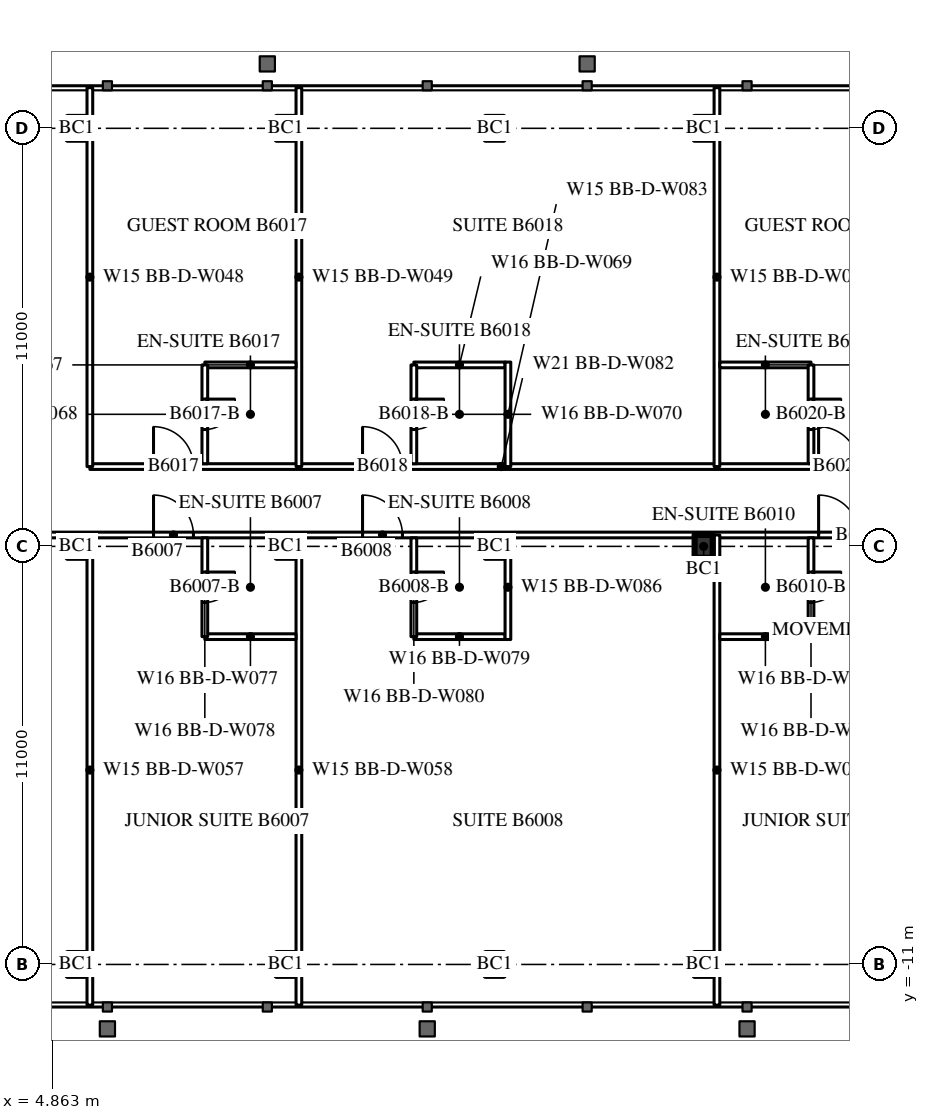
"""IFC4 building model, lengths in metres.
Left out: names, types, materials, properties, quantities, classifications, styles, units other than length and angle.
Written with IfcOpenShell. Run it as: python <this file> out.ifc"""

import sys

from ifc_helpers import new_model, si_unit, direction, frame, frame_2d, origin, origin_2d, place, context, subcontext, project, spatial, rectangle, i_section, extrude, element, fill, save


model = new_model("IFC4")
c1 = context("Model", 3, precision=1e-05, world=origin(), true_north=direction((0.0, 1.0)))
c2 = subcontext(c1, "Body", "Model", "MODEL_VIEW")
j1 = project(units=[si_unit("LENGTHUNIT", "METRE"), si_unit("PLANEANGLEUNIT", "RADIAN")], contexts=[c1])
p1 = place(None, origin())
s1 = spatial("IfcSite", under=j1, at=p1, CompositionType="ELEMENT")
p2 = place(p1, origin())
s2 = spatial("IfcBuilding", under=s1, at=p2, CompositionType="ELEMENT")
p3 = place(p2, frame((0.0, 0.0, 226.1)))
s3 = spatial("IfcBuildingStorey", under=s2, at=p3, CompositionType="ELEMENT", Elevation=226.1)
for number, where, z_axis, x_axis in (
    (1, (5.5, -11.0, 0.0), (0.0, 0.0, 1.0), (1.0, 0.0, 0.0)),
    (2, (11.0, -11.0, 0.0), (0.0, 0.0, 1.0), (1.0, 0.0, 0.0)),
    (3, (16.5, -11.0, 0.0), (0.0, 0.0, 1.0), (1.0, 0.0, 0.0)),
    (4, (22.0, -11.0, 0.0), (0.0, 0.0, 1.0), (1.0, 0.0, 0.0)),
    (5, (5.5, 0.0, 0.0), (0.0, 0.0, 1.0), (1.0, 0.0, 0.0)),
    (6, (11.0, 0.0, 0.0), (0.0, 0.0, 1.0), (1.0, 0.0, 0.0)),
    (7, (16.5, 0.0, 0.0), (0.0, 0.0, 1.0), (1.0, 0.0, 0.0)),
    (8, (22.0, 0.0, 0.0), (0.0, 0.0, 1.0), (1.0, 0.0, 0.0)),
    (9, (5.5, 11.0, 0.0), (0.0, 0.0, 1.0), (1.0, 0.0, 0.0)),
    (10, (11.0, 11.0, 0.0), (0.0, 0.0, 1.0), (1.0, 0.0, 0.0)),
    (11, (16.5, 11.0, 0.0), (0.0, 0.0, 1.0), (1.0, 0.0, 0.0)),
    (12, (22.0, 11.0, 0.0), (0.0, 0.0, 1.0), (1.0, 0.0, 0.0)),
):
    element("IfcColumn", number, at=place(p3, frame(where, z_axis=z_axis, x_axis=x_axis)), inside=s3, PredefinedType="COLUMN", context=c2, shape_type="SweptSolid", body=[
        extrude(i_section(OverallWidth=0.476, OverallDepth=0.6, WebThickness=0.1, FlangeThickness=0.14, FilletRadius=0.02, at=origin_2d()), origin(), (0.0, 0.0, 1.0), 3.6),
    ])
p4 = place(p3, frame((-27.5, 0.3, 0.0), z_axis=(0.0, 0.0, 1.0), x_axis=(1.0, 0.0, 0.0)))
e13 = element("IfcWall", 13, at=p4, inside=s3, PredefinedType="PARTITIONING", context=c2, shape_type="SweptSolid", body=[
    extrude(rectangle(XDim=55.0, YDim=0.15, at=frame_2d((27.5, 0.0))), origin(), (0.0, 0.0, 1.0), 2.4),
])
p5 = place(p4, frame((1.575, 0.0, 0.0)))
e14 = element("IfcOpeningElement", 14, at=p5, cuts=e13, PredefinedType="OPENING", context=c2, shape_type="SweptSolid", body=[
    extrude(rectangle(XDim=1.0, YDim=2.2, at=frame_2d((0.5, 1.1))), frame((0.0, 0.085, 0.0), z_axis=(0.0, -1.0, 0.0), x_axis=(1.0, 0.0, 0.0)), (0.0, 0.0, 1.0), 0.17),
])
p6 = place(p4, frame((7.525, 0.0, 0.0)))
e15 = element("IfcOpeningElement", 15, at=p6, cuts=e13, PredefinedType="OPENING", context=c2, shape_type="SweptSolid", body=[
    extrude(rectangle(XDim=1.05, YDim=2.4, at=frame_2d((0.525, 1.2))), frame((0.0, 0.085, 0.0), z_axis=(0.0, -1.0, 0.0), x_axis=(1.0, 0.0, 0.0)), (0.0, 0.0, 1.0), 0.17),
])
p7 = place(p4, frame((18.525, 0.0, 0.0)))
e16 = element("IfcOpeningElement", 16, at=p7, cuts=e13, PredefinedType="OPENING", context=c2, shape_type="SweptSolid", body=[
    extrude(rectangle(XDim=1.05, YDim=2.4, at=frame_2d((0.525, 1.2))), frame((0.0, 0.085, 0.0), z_axis=(0.0, -1.0, 0.0), x_axis=(1.0, 0.0, 0.0)), (0.0, 0.0, 1.0), 0.17),
])
p8 = place(p4, frame((24.025, 0.0, 0.0)))
e17 = element("IfcOpeningElement", 17, at=p8, cuts=e13, PredefinedType="OPENING", context=c2, shape_type="SweptSolid", body=[
    extrude(rectangle(XDim=1.05, YDim=2.4, at=frame_2d((0.525, 1.2))), frame((0.0, 0.085, 0.0), z_axis=(0.0, -1.0, 0.0), x_axis=(1.0, 0.0, 0.0)), (0.0, 0.0, 1.0), 0.17),
])
p9 = place(p4, frame((35.025, 0.0, 0.0)))
e18 = element("IfcOpeningElement", 18, at=p9, cuts=e13, PredefinedType="OPENING", context=c2, shape_type="SweptSolid", body=[
    extrude(rectangle(XDim=1.05, YDim=2.4, at=frame_2d((0.525, 1.2))), frame((0.0, 0.085, 0.0), z_axis=(0.0, -1.0, 0.0), x_axis=(1.0, 0.0, 0.0)), (0.0, 0.0, 1.0), 0.17),
])
p10 = place(p4, frame((40.525, 0.0, 0.0)))
e19 = element("IfcOpeningElement", 19, at=p10, cuts=e13, PredefinedType="OPENING", context=c2, shape_type="SweptSolid", body=[
    extrude(rectangle(XDim=1.05, YDim=2.4, at=frame_2d((0.525, 1.2))), frame((0.0, 0.085, 0.0), z_axis=(0.0, -1.0, 0.0), x_axis=(1.0, 0.0, 0.0)), (0.0, 0.0, 1.0), 0.17),
])
p11 = place(p4, frame((52.525, 0.0, 0.0)))
e20 = element("IfcOpeningElement", 20, at=p11, cuts=e13, PredefinedType="OPENING", context=c2, shape_type="SweptSolid", body=[
    extrude(rectangle(XDim=1.05, YDim=2.4, at=frame_2d((0.525, 1.2))), frame((0.0, 0.085, 0.0), z_axis=(0.0, -1.0, 0.0), x_axis=(1.0, 0.0, 0.0)), (0.0, 0.0, 1.0), 0.17),
])
p12 = place(p3, frame((5.85, 2.1, 0.0), z_axis=(0.0, 0.0, 1.0), x_axis=(1.0, 0.0, 0.0)))
e21 = element("IfcWall", 21, at=p12, inside=s3, PredefinedType="PARTITIONING", context=c2, shape_type="SweptSolid", body=[
    extrude(rectangle(XDim=21.65, YDim=0.15, at=frame_2d((10.825, 0.0))), origin(), (0.0, 0.0, 1.0), 3.4),
])
p13 = place(p12, frame((1.675, 0.0, 0.0)))
e22 = element("IfcOpeningElement", 22, at=p13, cuts=e21, PredefinedType="OPENING", context=c2, shape_type="SweptSolid", body=[
    extrude(rectangle(XDim=1.05, YDim=2.4, at=frame_2d((0.525, 1.2))), frame((0.0, 0.085, 0.0), z_axis=(0.0, -1.0, 0.0), x_axis=(1.0, 0.0, 0.0)), (0.0, 0.0, 1.0), 0.17),
])
p14 = place(p12, frame((7.175, 0.0, 0.0)))
e23 = element("IfcOpeningElement", 23, at=p14, cuts=e21, PredefinedType="OPENING", context=c2, shape_type="SweptSolid", body=[
    extrude(rectangle(XDim=1.05, YDim=2.4, at=frame_2d((0.525, 1.2))), frame((0.0, 0.085, 0.0), z_axis=(0.0, -1.0, 0.0), x_axis=(1.0, 0.0, 0.0)), (0.0, 0.0, 1.0), 0.17),
])
p15 = place(p12, frame((19.175, 0.0, 0.0)))
e24 = element("IfcOpeningElement", 24, at=p15, cuts=e21, PredefinedType="OPENING", context=c2, shape_type="SweptSolid", body=[
    extrude(rectangle(XDim=1.05, YDim=2.4, at=frame_2d((0.525, 1.2))), frame((0.0, 0.085, 0.0), z_axis=(0.0, -1.0, 0.0), x_axis=(1.0, 0.0, 0.0)), (0.0, 0.0, 1.0), 0.17),
])
for number, where, z_axis, x_axis in (
    (25, (5.85, -12.07, 0.0), (0.0, 0.0, 1.0), (0.0, 1.0, 0.0)),
    (26, (11.35, -12.07, 0.0), (0.0, 0.0, 1.0), (0.0, 1.0, 0.0)),
    (27, (22.35, -12.07, 0.0), (0.0, 0.0, 1.0), (0.0, 1.0, 0.0)),
):
    element("IfcWall", number, at=place(p3, frame(where, z_axis=z_axis, x_axis=x_axis)), inside=s3, PredefinedType="PARTITIONING", context=c2, shape_type="SweptSolid", body=[
        extrude(rectangle(XDim=12.37, YDim=0.15, at=frame_2d((6.185, 0.0))), origin(), (0.0, 0.0, 1.0), 3.4),
    ])
p16 = place(p3, frame((8.875, -2.375, 0.0), z_axis=(0.0, 0.0, 1.0), x_axis=(1.0, 0.0, 0.0)))
e28 = element("IfcWall", 28, at=p16, inside=s3, PredefinedType="PARTITIONING", context=c2, shape_type="SweptSolid", body=[
    extrude(rectangle(XDim=2.4, YDim=0.15, at=frame_2d((1.2, 0.0))), origin(), (0.0, 0.0, 1.0), 3.4),
])
p17 = place(p3, frame((8.875, -2.375, 0.0), z_axis=(0.0, 0.0, 1.0), x_axis=(0.0, 1.0, 0.0)))
e29 = element("IfcWall", 29, at=p17, inside=s3, PredefinedType="PARTITIONING", context=c2, shape_type="SweptSolid", body=[
    extrude(rectangle(XDim=2.6, YDim=0.15, at=frame_2d((1.3, 0.0))), origin(), (0.0, 0.0, 1.0), 3.4),
])
p18 = place(p17, frame((0.9, 0.0, 0.0)))
e30 = element("IfcOpeningElement", 30, at=p18, cuts=e29, PredefinedType="OPENING", context=c2, shape_type="SweptSolid", body=[
    extrude(rectangle(XDim=0.8, YDim=2.2, at=frame_2d((0.4, 1.1))), frame((0.0, 0.085, 0.0), z_axis=(0.0, -1.0, 0.0), x_axis=(1.0, 0.0, 0.0)), (0.0, 0.0, 1.0), 0.17),
])
p19 = place(p3, frame((14.375, -2.375, 0.0), z_axis=(0.0, 0.0, 1.0), x_axis=(1.0, 0.0, 0.0)))
e31 = element("IfcWall", 31, at=p19, inside=s3, PredefinedType="PARTITIONING", context=c2, shape_type="SweptSolid", body=[
    extrude(rectangle(XDim=2.4, YDim=0.15, at=frame_2d((1.2, 0.0))), origin(), (0.0, 0.0, 1.0), 3.4),
])
p20 = place(p3, frame((14.375, -2.375, 0.0), z_axis=(0.0, 0.0, 1.0), x_axis=(0.0, 1.0, 0.0)))
e32 = element("IfcWall", 32, at=p20, inside=s3, PredefinedType="PARTITIONING", context=c2, shape_type="SweptSolid", body=[
    extrude(rectangle(XDim=2.6, YDim=0.15, at=frame_2d((1.3, 0.0))), origin(), (0.0, 0.0, 1.0), 3.4),
])
p21 = place(p20, frame((0.9, 0.0, 0.0)))
e33 = element("IfcOpeningElement", 33, at=p21, cuts=e32, PredefinedType="OPENING", context=c2, shape_type="SweptSolid", body=[
    extrude(rectangle(XDim=0.8, YDim=2.2, at=frame_2d((0.4, 1.1))), frame((0.0, 0.085, 0.0), z_axis=(0.0, -1.0, 0.0), x_axis=(1.0, 0.0, 0.0)), (0.0, 0.0, 1.0), 0.17),
])
p22 = place(p3, frame((22.425, -2.375, 0.0), z_axis=(0.0, 0.0, 1.0), x_axis=(1.0, 0.0, 0.0)))
e34 = element("IfcWall", 34, at=p22, inside=s3, PredefinedType="PARTITIONING", context=c2, shape_type="SweptSolid", body=[
    extrude(rectangle(XDim=2.4, YDim=0.15, at=frame_2d((1.2, 0.0))), origin(), (0.0, 0.0, 1.0), 3.4),
])
p23 = place(p3, frame((24.825, -2.375, 0.0), z_axis=(0.0, 0.0, 1.0), x_axis=(0.0, 1.0, 0.0)))
e35 = element("IfcWall", 35, at=p23, inside=s3, PredefinedType="PARTITIONING", context=c2, shape_type="SweptSolid", body=[
    extrude(rectangle(XDim=2.6, YDim=0.15, at=frame_2d((1.3, 0.0))), origin(), (0.0, 0.0, 1.0), 3.4),
])
p24 = place(p23, frame((0.9, 0.0, 0.0)))
e36 = element("IfcOpeningElement", 36, at=p24, cuts=e35, PredefinedType="OPENING", context=c2, shape_type="SweptSolid", body=[
    extrude(rectangle(XDim=0.8, YDim=2.2, at=frame_2d((0.4, 1.1))), frame((0.0, 0.085, 0.0), z_axis=(0.0, -1.0, 0.0), x_axis=(1.0, 0.0, 0.0)), (0.0, 0.0, 1.0), 0.17),
])
for number, where, z_axis, x_axis in (
    (37, (5.85, 2.1, 0.0), (0.0, 0.0, 1.0), (0.0, 1.0, 0.0)),
    (38, (11.35, 2.1, 0.0), (0.0, 0.0, 1.0), (0.0, 1.0, 0.0)),
    (39, (22.35, 2.1, 0.0), (0.0, 0.0, 1.0), (0.0, 1.0, 0.0)),
):
    element("IfcWall", number, at=place(p3, frame(where, z_axis=z_axis, x_axis=x_axis)), inside=s3, PredefinedType="PARTITIONING", context=c2, shape_type="SweptSolid", body=[
        extrude(rectangle(XDim=9.97, YDim=0.15, at=frame_2d((4.985, 0.0))), origin(), (0.0, 0.0, 1.0), 3.4),
    ])
p25 = place(p3, frame((8.875, 4.775, 0.0), z_axis=(0.0, 0.0, 1.0), x_axis=(1.0, 0.0, 0.0)))
e40 = element("IfcWall", 40, at=p25, inside=s3, PredefinedType="PARTITIONING", context=c2, shape_type="SweptSolid", body=[
    extrude(rectangle(XDim=2.4, YDim=0.15, at=frame_2d((1.2, 0.0))), origin(), (0.0, 0.0, 1.0), 3.4),
])
p26 = place(p3, frame((8.875, 2.175, 0.0), z_axis=(0.0, 0.0, 1.0), x_axis=(0.0, 1.0, 0.0)))
e41 = element("IfcWall", 41, at=p26, inside=s3, PredefinedType="PARTITIONING", context=c2, shape_type="SweptSolid", body=[
    extrude(rectangle(XDim=2.6, YDim=0.15, at=frame_2d((1.3, 0.0))), origin(), (0.0, 0.0, 1.0), 3.4),
])
p27 = place(p26, frame((0.9, 0.0, 0.0)))
e42 = element("IfcOpeningElement", 42, at=p27, cuts=e41, PredefinedType="OPENING", context=c2, shape_type="SweptSolid", body=[
    extrude(rectangle(XDim=0.8, YDim=2.2, at=frame_2d((0.4, 1.1))), frame((0.0, 0.085, 0.0), z_axis=(0.0, -1.0, 0.0), x_axis=(1.0, 0.0, 0.0)), (0.0, 0.0, 1.0), 0.17),
])
p28 = place(p3, frame((14.375, 4.775, 0.0), z_axis=(0.0, 0.0, 1.0), x_axis=(1.0, 0.0, 0.0)))
e43 = element("IfcWall", 43, at=p28, inside=s3, PredefinedType="PARTITIONING", context=c2, shape_type="SweptSolid", body=[
    extrude(rectangle(XDim=2.4, YDim=0.15, at=frame_2d((1.2, 0.0))), origin(), (0.0, 0.0, 1.0), 3.4),
])
p29 = place(p3, frame((14.375, 2.175, 0.0), z_axis=(0.0, 0.0, 1.0), x_axis=(0.0, 1.0, 0.0)))
e44 = element("IfcWall", 44, at=p29, inside=s3, PredefinedType="PARTITIONING", context=c2, shape_type="SweptSolid", body=[
    extrude(rectangle(XDim=2.6, YDim=0.15, at=frame_2d((1.3, 0.0))), origin(), (0.0, 0.0, 1.0), 3.4),
])
p30 = place(p29, frame((0.9, 0.0, 0.0)))
e45 = element("IfcOpeningElement", 45, at=p30, cuts=e44, PredefinedType="OPENING", context=c2, shape_type="SweptSolid", body=[
    extrude(rectangle(XDim=0.8, YDim=2.2, at=frame_2d((0.4, 1.1))), frame((0.0, 0.085, 0.0), z_axis=(0.0, -1.0, 0.0), x_axis=(1.0, 0.0, 0.0)), (0.0, 0.0, 1.0), 0.17),
])
p31 = place(p3, frame((22.425, 4.775, 0.0), z_axis=(0.0, 0.0, 1.0), x_axis=(1.0, 0.0, 0.0)))
e46 = element("IfcWall", 46, at=p31, inside=s3, PredefinedType="PARTITIONING", context=c2, shape_type="SweptSolid", body=[
    extrude(rectangle(XDim=2.4, YDim=0.15, at=frame_2d((1.2, 0.0))), origin(), (0.0, 0.0, 1.0), 3.4),
])
p32 = place(p3, frame((24.825, 2.175, 0.0), z_axis=(0.0, 0.0, 1.0), x_axis=(0.0, 1.0, 0.0)))
e47 = element("IfcWall", 47, at=p32, inside=s3, PredefinedType="PARTITIONING", context=c2, shape_type="SweptSolid", body=[
    extrude(rectangle(XDim=2.6, YDim=0.15, at=frame_2d((1.3, 0.0))), origin(), (0.0, 0.0, 1.0), 3.4),
])
p33 = place(p32, frame((0.9, 0.0, 0.0)))
e48 = element("IfcOpeningElement", 48, at=p33, cuts=e47, PredefinedType="OPENING", context=c2, shape_type="SweptSolid", body=[
    extrude(rectangle(XDim=0.8, YDim=2.2, at=frame_2d((0.4, 1.1))), frame((0.0, 0.085, 0.0), z_axis=(0.0, -1.0, 0.0), x_axis=(1.0, 0.0, 0.0)), (0.0, 0.0, 1.0), 0.17),
])
for number, where, z_axis, x_axis in (
    (49, (16.85, -2.45, 0.0), (0.0, 0.0, 1.0), (0.0, 1.0, 0.0)),
    (50, (16.85, 2.1, 0.0), (0.0, 0.0, 1.0), (0.0, 1.0, 0.0)),
):
    element("IfcWall", number, at=place(p3, frame(where, z_axis=z_axis, x_axis=x_axis)), inside=s3, PredefinedType="PARTITIONING", context=c2, shape_type="SweptSolid", body=[
        extrude(rectangle(XDim=2.75, YDim=0.15, at=frame_2d((1.375, 0.0))), origin(), (0.0, 0.0, 1.0), 3.4),
    ])
p34 = place(p18, origin())
e51 = element("IfcDoor", 51, at=p34, inside=s3, OperationType="SINGLE_SWING_RIGHT", PredefinedType="DOOR", context=c2, shape_type="SweptSolid", body=[
    extrude(rectangle(XDim=0.8, YDim=2.2, at=frame_2d((0.4, 1.1))), frame((0.0, 0.025, 0.0), z_axis=(0.0, -1.0, 0.0), x_axis=(1.0, 0.0, 0.0)), (0.0, 0.0, 1.0), 0.05),
])
fill(e30, e51)
p35 = place(p9, origin())
e52 = element("IfcDoor", 52, at=p35, inside=s3, OperationType="SINGLE_SWING_LEFT", PredefinedType="DOOR", context=c2, shape_type="SweptSolid", body=[
    extrude(rectangle(XDim=1.05, YDim=2.4, at=frame_2d((0.525, 1.2))), frame((0.0, 0.025, 0.0), z_axis=(0.0, -1.0, 0.0), x_axis=(1.0, 0.0, 0.0)), (0.0, 0.0, 1.0), 0.05),
])
fill(e18, e52)
p36 = place(p21, origin())
e53 = element("IfcDoor", 53, at=p36, inside=s3, OperationType="SINGLE_SWING_RIGHT", PredefinedType="DOOR", context=c2, shape_type="SweptSolid", body=[
    extrude(rectangle(XDim=0.8, YDim=2.2, at=frame_2d((0.4, 1.1))), frame((0.0, 0.025, 0.0), z_axis=(0.0, -1.0, 0.0), x_axis=(1.0, 0.0, 0.0)), (0.0, 0.0, 1.0), 0.05),
])
fill(e33, e53)
p37 = place(p10, origin())
e54 = element("IfcDoor", 54, at=p37, inside=s3, OperationType="SINGLE_SWING_LEFT", PredefinedType="DOOR", context=c2, shape_type="SweptSolid", body=[
    extrude(rectangle(XDim=1.05, YDim=2.4, at=frame_2d((0.525, 1.2))), frame((0.0, 0.025, 0.0), z_axis=(0.0, -1.0, 0.0), x_axis=(1.0, 0.0, 0.0)), (0.0, 0.0, 1.0), 0.05),
])
fill(e19, e54)
p38 = place(p24, origin())
e55 = element("IfcDoor", 55, at=p38, inside=s3, OperationType="SINGLE_SWING_RIGHT", PredefinedType="DOOR", context=c2, shape_type="SweptSolid", body=[
    extrude(rectangle(XDim=0.8, YDim=2.2, at=frame_2d((0.4, 1.1))), frame((0.0, 0.025, 0.0), z_axis=(0.0, -1.0, 0.0), x_axis=(1.0, 0.0, 0.0)), (0.0, 0.0, 1.0), 0.05),
])
fill(e36, e55)
p39 = place(p11, origin())
e56 = element("IfcDoor", 56, at=p39, inside=s3, OperationType="SINGLE_SWING_LEFT", PredefinedType="DOOR", context=c2, shape_type="SweptSolid", body=[
    extrude(rectangle(XDim=1.05, YDim=2.4, at=frame_2d((0.525, 1.2))), frame((0.0, 0.025, 0.0), z_axis=(0.0, -1.0, 0.0), x_axis=(1.0, 0.0, 0.0)), (0.0, 0.0, 1.0), 0.05),
])
fill(e20, e56)
p40 = place(p27, origin())
e57 = element("IfcDoor", 57, at=p40, inside=s3, OperationType="SINGLE_SWING_RIGHT", PredefinedType="DOOR", context=c2, shape_type="SweptSolid", body=[
    extrude(rectangle(XDim=0.8, YDim=2.2, at=frame_2d((0.4, 1.1))), frame((0.0, 0.025, 0.0), z_axis=(0.0, -1.0, 0.0), x_axis=(1.0, 0.0, 0.0)), (0.0, 0.0, 1.0), 0.05),
])
fill(e42, e57)
p41 = place(p13, origin())
e58 = element("IfcDoor", 58, at=p41, inside=s3, OperationType="SINGLE_SWING_LEFT", PredefinedType="DOOR", context=c2, shape_type="SweptSolid", body=[
    extrude(rectangle(XDim=1.05, YDim=2.4, at=frame_2d((0.525, 1.2))), frame((0.0, 0.025, 0.0), z_axis=(0.0, -1.0, 0.0), x_axis=(1.0, 0.0, 0.0)), (0.0, 0.0, 1.0), 0.05),
])
fill(e22, e58)
p42 = place(p30, origin())
e59 = element("IfcDoor", 59, at=p42, inside=s3, OperationType="SINGLE_SWING_RIGHT", PredefinedType="DOOR", context=c2, shape_type="SweptSolid", body=[
    extrude(rectangle(XDim=0.8, YDim=2.2, at=frame_2d((0.4, 1.1))), frame((0.0, 0.025, 0.0), z_axis=(0.0, -1.0, 0.0), x_axis=(1.0, 0.0, 0.0)), (0.0, 0.0, 1.0), 0.05),
])
fill(e45, e59)
p43 = place(p14, origin())
e60 = element("IfcDoor", 60, at=p43, inside=s3, OperationType="SINGLE_SWING_LEFT", PredefinedType="DOOR", context=c2, shape_type="SweptSolid", body=[
    extrude(rectangle(XDim=1.05, YDim=2.4, at=frame_2d((0.525, 1.2))), frame((0.0, 0.025, 0.0), z_axis=(0.0, -1.0, 0.0), x_axis=(1.0, 0.0, 0.0)), (0.0, 0.0, 1.0), 0.05),
])
fill(e23, e60)
p44 = place(p33, origin())
e61 = element("IfcDoor", 61, at=p44, inside=s3, OperationType="SINGLE_SWING_RIGHT", PredefinedType="DOOR", context=c2, shape_type="SweptSolid", body=[
    extrude(rectangle(XDim=0.8, YDim=2.2, at=frame_2d((0.4, 1.1))), frame((0.0, 0.025, 0.0), z_axis=(0.0, -1.0, 0.0), x_axis=(1.0, 0.0, 0.0)), (0.0, 0.0, 1.0), 0.05),
])
fill(e48, e61)
p45 = place(p15, origin())
e62 = element("IfcDoor", 62, at=p45, inside=s3, OperationType="SINGLE_SWING_LEFT", PredefinedType="DOOR", context=c2, shape_type="SweptSolid", body=[
    extrude(rectangle(XDim=1.05, YDim=2.4, at=frame_2d((0.525, 1.2))), frame((0.0, 0.025, 0.0), z_axis=(0.0, -1.0, 0.0), x_axis=(1.0, 0.0, 0.0)), (0.0, 0.0, 1.0), 0.05),
])
fill(e24, e62)
save(model, sys.argv[1])
